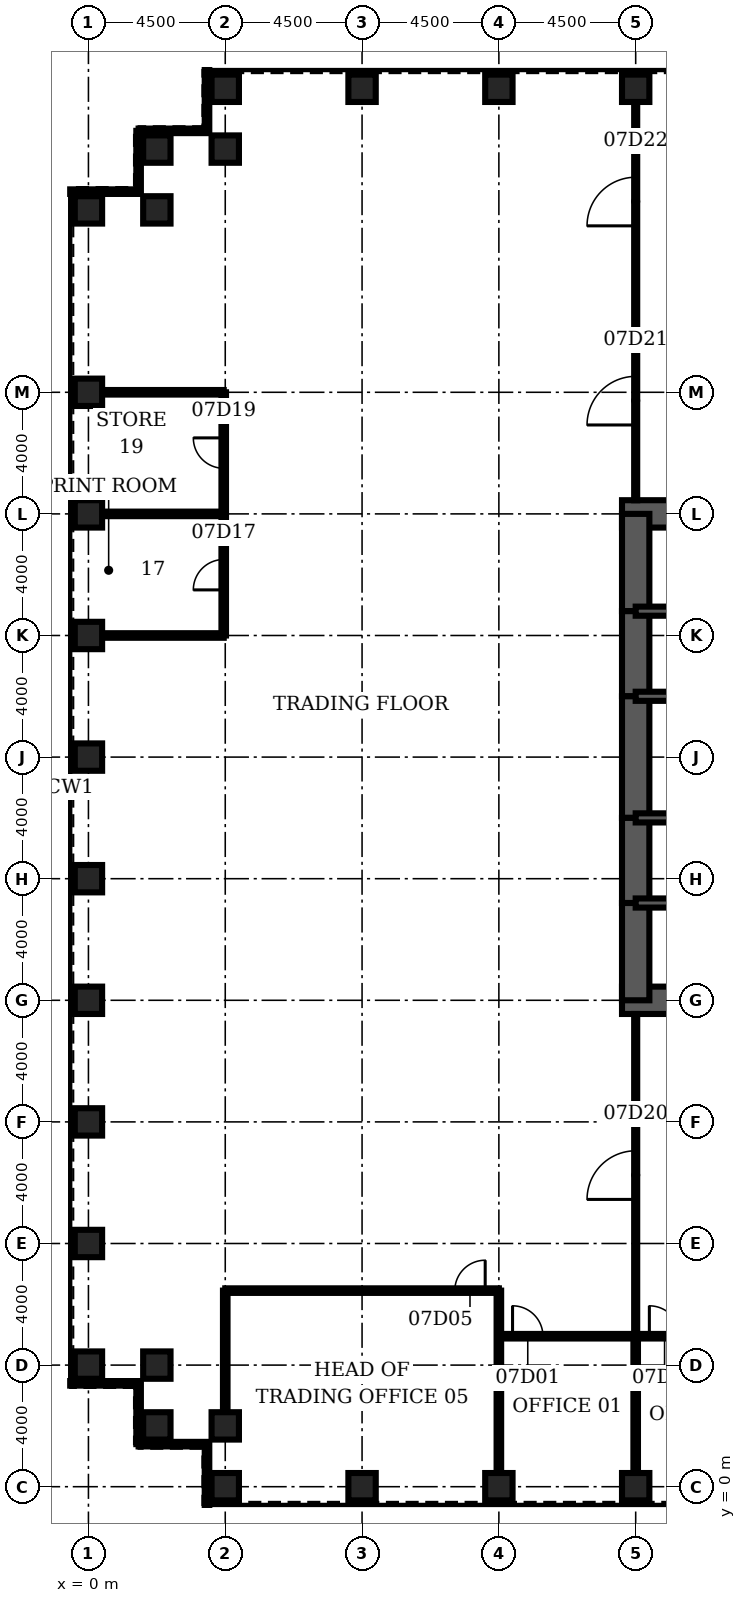
"""IFC4 building model, lengths in metres.
Left out: names, types, materials, properties, quantities, classifications, styles, units other than length and angle.
Written with IfcOpenShell. Run it as: python <this file> out.ifc"""

import sys

from ifc_helpers import new_model, si_unit, direction, frame, frame_2d, origin, origin_2d, place, context, subcontext, project, spatial, rectangle, hollow_rectangle, extrude, element, fill, save


model = new_model("IFC4")
c1 = context("Model", 3, precision=1e-05, world=origin(), true_north=direction((0.0, 1.0)))
c2 = subcontext(c1, "Body", "Model", "MODEL_VIEW")
j1 = project(units=[si_unit("LENGTHUNIT", "METRE"), si_unit("PLANEANGLEUNIT", "RADIAN")], contexts=[c1])
p1 = place(None, origin())
s1 = spatial("IfcSite", under=j1, at=p1, CompositionType="ELEMENT")
p2 = place(p1, origin())
s2 = spatial("IfcBuilding", under=s1, at=p2, CompositionType="ELEMENT")
p3 = place(p2, frame((0.0, 0.0, 36.5)))
s3 = spatial("IfcBuildingStorey", under=s2, at=p3, CompositionType="ELEMENT", Elevation=36.5)
for number, where, z_axis, x_axis in (
    (1, (4.5, 0.0, 0.0), (0.0, 0.0, 1.0), (0.0, 1.0, 0.0)),
    (2, (9.0, 0.0, 0.0), (0.0, 0.0, 1.0), (0.0, 1.0, 0.0)),
    (3, (13.5, 0.0, 0.0), (0.0, 0.0, 1.0), (0.0, 1.0, 0.0)),
    (4, (18.0, 0.0, 0.0), (0.0, 0.0, 1.0), (0.0, 1.0, 0.0)),
    (5, (18.0, 46.0, 0.0), (0.0, 0.0, 1.0), (0.0, 1.0, 0.0)),
    (6, (13.5, 46.0, 0.0), (0.0, 0.0, 1.0), (0.0, 1.0, 0.0)),
    (7, (9.0, 46.0, 0.0), (0.0, 0.0, 1.0), (0.0, 1.0, 0.0)),
    (8, (4.5, 46.0, 0.0), (0.0, 0.0, 1.0), (0.0, 1.0, 0.0)),
    (9, (4.5, 44.0, 0.0), (0.0, 0.0, 1.0), (0.0, 1.0, 0.0)),
    (10, (2.25, 44.0, 0.0), (0.0, 0.0, 1.0), (1.0, 0.0, 0.0)),
    (11, (2.25, 42.0, 0.0), (0.0, 0.0, 1.0), (1.0, 0.0, 0.0)),
    (12, (0.0, 42.0, 0.0), (0.0, 0.0, 1.0), (1.0, 0.0, 0.0)),
    (13, (0.0, 36.0, 0.0), (0.0, 0.0, 1.0), (1.0, 0.0, 0.0)),
    (14, (0.0, 32.0, 0.0), (0.0, 0.0, 1.0), (1.0, 0.0, 0.0)),
    (15, (0.0, 28.0, 0.0), (0.0, 0.0, 1.0), (1.0, 0.0, 0.0)),
    (16, (0.0, 24.0, 0.0), (0.0, 0.0, 1.0), (1.0, 0.0, 0.0)),
    (17, (0.0, 20.0, 0.0), (0.0, 0.0, 1.0), (1.0, 0.0, 0.0)),
    (18, (0.0, 16.0, 0.0), (0.0, 0.0, 1.0), (1.0, 0.0, 0.0)),
    (19, (0.0, 12.0, 0.0), (0.0, 0.0, 1.0), (1.0, 0.0, 0.0)),
    (20, (0.0, 8.0, 0.0), (0.0, 0.0, 1.0), (1.0, 0.0, 0.0)),
    (21, (0.0, 4.0, 0.0), (0.0, 0.0, 1.0), (1.0, 0.0, 0.0)),
    (22, (2.25, 4.0, 0.0), (0.0, 0.0, 1.0), (1.0, 0.0, 0.0)),
    (23, (2.25, 2.0, 0.0), (0.0, 0.0, 1.0), (1.0, 0.0, 0.0)),
    (24, (4.5, 2.0, 0.0), (0.0, 0.0, 1.0), (0.0, 1.0, 0.0)),
):
    element("IfcColumn", number, at=place(p3, frame(where, z_axis=z_axis, x_axis=x_axis)), inside=s3, PredefinedType="COLUMN", context=c2, shape_type="SweptSolid", body=[
        extrude(hollow_rectangle(XDim=0.9, YDim=0.9, WallThickness=0.12, at=origin_2d()), origin(), (0.0, 0.0, 1.0), 4.5),
    ])
for number, where, z_axis, x_axis in (
    (25, (17.55, 16.0, 0.0), (0.0, 0.0, 1.0), (1.0, 0.0, 0.0)),
    (26, (27.0, 32.0, 0.0), (0.0, 0.0, 1.0), (-1.0, 0.0, 0.0)),
):
    element("IfcWall", number, at=place(p3, frame(where, z_axis=z_axis, x_axis=x_axis)), inside=s3, PredefinedType="SHEAR", context=c2, shape_type="SweptSolid", body=[
        extrude(rectangle(XDim=9.45, YDim=0.9, at=frame_2d((4.725, 0.0))), origin(), (0.0, 0.0, 1.0), 4.5),
    ])
p4 = place(p3, frame((18.0, 32.0, 0.0), z_axis=(0.0, 0.0, 1.0), x_axis=(0.0, -1.0, 0.0)))
e27 = element("IfcWall", 27, at=p4, inside=s3, PredefinedType="SHEAR", context=c2, shape_type="SweptSolid", body=[
    extrude(rectangle(XDim=3.2, YDim=0.9, at=frame_2d((1.6, 0.0))), origin(), (0.0, 0.0, 1.0), 4.5),
])
p5 = place(p3, frame((18.0, 28.8, 0.0), z_axis=(0.0, 0.0, 1.0), x_axis=(0.0, -1.0, 0.0)))
e28 = element("IfcWall", 28, at=p5, inside=s3, PredefinedType="SHEAR", context=c2, shape_type="SweptSolid", body=[
    extrude(rectangle(XDim=2.8, YDim=0.9, at=frame_2d((1.4, 0.0))), origin(), (0.0, 0.0, 1.0), 4.5),
])
p6 = place(p5, frame((0.4, 0.0, 0.0)))
e29 = element("IfcOpeningElement", 29, at=p6, cuts=e28, PredefinedType="OPENING", context=c2, shape_type="SweptSolid", body=[
    extrude(rectangle(XDim=1.8, YDim=2.1, at=frame_2d((0.9, 1.05))), frame((0.0, 0.46, 0.0), z_axis=(0.0, -1.0, 0.0), x_axis=(1.0, 0.0, 0.0)), (0.0, 0.0, 1.0), 0.92),
])
p7 = place(p3, frame((18.0, 26.0, 0.0), z_axis=(0.0, 0.0, 1.0), x_axis=(0.0, -1.0, 0.0)))
e30 = element("IfcWall", 30, at=p7, inside=s3, PredefinedType="SHEAR", context=c2, shape_type="SweptSolid", body=[
    extrude(rectangle(XDim=4.0, YDim=0.9, at=frame_2d((2.0, 0.0))), origin(), (0.0, 0.0, 1.0), 4.5),
])
p8 = place(p3, frame((18.0, 22.0, 0.0), z_axis=(0.0, 0.0, 1.0), x_axis=(0.0, -1.0, 0.0)))
e31 = element("IfcWall", 31, at=p8, inside=s3, PredefinedType="SHEAR", context=c2, shape_type="SweptSolid", body=[
    extrude(rectangle(XDim=2.8, YDim=0.9, at=frame_2d((1.4, 0.0))), origin(), (0.0, 0.0, 1.0), 4.5),
])
p9 = place(p8, frame((0.6, 0.0, 0.0)))
e32 = element("IfcOpeningElement", 32, at=p9, cuts=e31, PredefinedType="OPENING", context=c2, shape_type="SweptSolid", body=[
    extrude(rectangle(XDim=1.8, YDim=2.1, at=frame_2d((0.9, 1.05))), frame((0.0, 0.46, 0.0), z_axis=(0.0, -1.0, 0.0), x_axis=(1.0, 0.0, 0.0)), (0.0, 0.0, 1.0), 0.92),
])
p10 = place(p3, frame((18.0, 19.2, 0.0), z_axis=(0.0, 0.0, 1.0), x_axis=(0.0, -1.0, 0.0)))
e33 = element("IfcWall", 33, at=p10, inside=s3, PredefinedType="SHEAR", context=c2, shape_type="SweptSolid", body=[
    extrude(rectangle(XDim=3.2, YDim=0.9, at=frame_2d((1.6, 0.0))), origin(), (0.0, 0.0, 1.0), 4.5),
])
p11 = place(p3, frame((18.0, 19.2, 0.0), z_axis=(0.0, 0.0, 1.0), x_axis=(1.0, 0.0, 0.0)))
e34 = element("IfcWall", 34, at=p11, inside=s3, PredefinedType="SOLIDWALL", context=c2, shape_type="SweptSolid", body=[
    extrude(rectangle(XDim=9.0, YDim=0.3, at=frame_2d((4.5, 0.0))), origin(), (0.0, 0.0, 1.0), 4.5),
])
p12 = place(p11, frame((0.65, 0.0, 0.0)))
e35 = element("IfcOpeningElement", 35, at=p12, cuts=e34, PredefinedType="OPENING", context=c2, shape_type="SweptSolid", body=[
    extrude(rectangle(XDim=1.0, YDim=2.1, at=frame_2d((0.5, 1.05))), frame((0.0, 0.16, 0.0), z_axis=(0.0, -1.0, 0.0), x_axis=(1.0, 0.0, 0.0)), (0.0, 0.0, 1.0), 0.32),
])
p13 = place(p3, frame((18.0, 28.8, 0.0), z_axis=(0.0, 0.0, 1.0), x_axis=(1.0, 0.0, 0.0)))
e36 = element("IfcWall", 36, at=p13, inside=s3, PredefinedType="SOLIDWALL", context=c2, shape_type="SweptSolid", body=[
    extrude(rectangle(XDim=9.0, YDim=0.3, at=frame_2d((4.5, 0.0))), origin(), (0.0, 0.0, 1.0), 4.5),
])
p14 = place(p13, frame((0.65, 0.0, 0.0)))
e37 = element("IfcOpeningElement", 37, at=p14, cuts=e36, PredefinedType="OPENING", context=c2, shape_type="SweptSolid", body=[
    extrude(rectangle(XDim=1.0, YDim=2.1, at=frame_2d((0.5, 1.05))), frame((0.0, 0.16, 0.0), z_axis=(0.0, -1.0, 0.0), x_axis=(1.0, 0.0, 0.0)), (0.0, 0.0, 1.0), 0.32),
])
p15 = place(p3, frame((18.0, 22.0, 0.0), z_axis=(0.0, 0.0, 1.0), x_axis=(1.0, 0.0, 0.0)))
e38 = element("IfcWall", 38, at=p15, inside=s3, PredefinedType="SOLIDWALL", context=c2, shape_type="SweptSolid", body=[
    extrude(rectangle(XDim=6.0, YDim=0.3, at=frame_2d((3.0, 0.0))), origin(), (0.0, 0.0, 1.0), 4.5),
])
p16 = place(p15, frame((2.0, 0.0, 0.0)))
e39 = element("IfcOpeningElement", 39, at=p16, cuts=e38, PredefinedType="OPENING", context=c2, shape_type="SweptSolid", body=[
    extrude(rectangle(XDim=1.0, YDim=2.1, at=frame_2d((0.5, 1.05))), frame((0.0, 0.16, 0.0), z_axis=(0.0, -1.0, 0.0), x_axis=(1.0, 0.0, 0.0)), (0.0, 0.0, 1.0), 0.32),
])
p17 = place(p3, frame((18.0, 26.0, 0.0), z_axis=(0.0, 0.0, 1.0), x_axis=(1.0, 0.0, 0.0)))
e40 = element("IfcWall", 40, at=p17, inside=s3, PredefinedType="SOLIDWALL", context=c2, shape_type="SweptSolid", body=[
    extrude(rectangle(XDim=6.0, YDim=0.3, at=frame_2d((3.0, 0.0))), origin(), (0.0, 0.0, 1.0), 4.5),
])
p18 = place(p3, frame((13.5, 4.95, 0.0), z_axis=(0.0, 0.0, 1.0), x_axis=(1.0, 0.0, 0.0)))
e41 = element("IfcWall", 41, at=p18, inside=s3, PredefinedType="PARTITIONING", context=c2, shape_type="SweptSolid", body=[
    extrude(rectangle(XDim=13.5, YDim=0.15, at=frame_2d((6.75, 0.0))), origin(), (0.0, 0.0, 1.0), 3.0),
])
p19 = place(p18, frame((0.45, 0.0, 0.0)))
e42 = element("IfcOpeningElement", 42, at=p19, cuts=e41, PredefinedType="OPENING", context=c2, shape_type="SweptSolid", body=[
    extrude(rectangle(XDim=1.0, YDim=2.1, at=frame_2d((0.5, 1.05))), frame((0.0, 0.085, 0.0), z_axis=(0.0, -1.0, 0.0), x_axis=(1.0, 0.0, 0.0)), (0.0, 0.0, 1.0), 0.17),
])
p20 = place(p18, frame((4.95, 0.0, 0.0)))
e43 = element("IfcOpeningElement", 43, at=p20, cuts=e41, PredefinedType="OPENING", context=c2, shape_type="SweptSolid", body=[
    extrude(rectangle(XDim=1.0, YDim=2.1, at=frame_2d((0.5, 1.05))), frame((0.0, 0.085, 0.0), z_axis=(0.0, -1.0, 0.0), x_axis=(1.0, 0.0, 0.0)), (0.0, 0.0, 1.0), 0.17),
])
p21 = place(p18, frame((9.45, 0.0, 0.0)))
e44 = element("IfcOpeningElement", 44, at=p21, cuts=e41, PredefinedType="OPENING", context=c2, shape_type="SweptSolid", body=[
    extrude(rectangle(XDim=1.0, YDim=2.1, at=frame_2d((0.5, 1.05))), frame((0.0, 0.085, 0.0), z_axis=(0.0, -1.0, 0.0), x_axis=(1.0, 0.0, 0.0)), (0.0, 0.0, 1.0), 0.17),
])
p22 = place(p3, frame((4.5, 6.45, 0.0), z_axis=(0.0, 0.0, 1.0), x_axis=(1.0, 0.0, 0.0)))
e45 = element("IfcWall", 45, at=p22, inside=s3, PredefinedType="PARTITIONING", context=c2, shape_type="SweptSolid", body=[
    extrude(rectangle(XDim=9.0, YDim=0.15, at=frame_2d((4.5, 0.0))), origin(), (0.0, 0.0, 1.0), 3.0),
])
p23 = place(p22, frame((7.55, 0.0, 0.0)))
e46 = element("IfcOpeningElement", 46, at=p23, cuts=e45, PredefinedType="OPENING", context=c2, shape_type="SweptSolid", body=[
    extrude(rectangle(XDim=1.0, YDim=2.1, at=frame_2d((0.5, 1.05))), frame((0.0, 0.085, 0.0), z_axis=(0.0, -1.0, 0.0), x_axis=(1.0, 0.0, 0.0)), (0.0, 0.0, 1.0), 0.17),
])
for number, where, z_axis, x_axis in (
    (47, (0.45, 28.0, 0.0), (0.0, 0.0, 1.0), (1.0, 0.0, 0.0)),
    (48, (0.45, 32.0, 0.0), (0.0, 0.0, 1.0), (1.0, 0.0, 0.0)),
    (49, (0.45, 36.0, 0.0), (0.0, 0.0, 1.0), (1.0, 0.0, 0.0)),
):
    element("IfcWall", number, at=place(p3, frame(where, z_axis=z_axis, x_axis=x_axis)), inside=s3, PredefinedType="PARTITIONING", context=c2, shape_type="SweptSolid", body=[
        extrude(rectangle(XDim=4.0, YDim=0.15, at=frame_2d((2.0, 0.0))), origin(), (0.0, 0.0, 1.0), 3.0),
    ])
p24 = place(p3, frame((4.45, 28.0, 0.0), z_axis=(0.0, 0.0, 1.0), x_axis=(0.0, 1.0, 0.0)))
e50 = element("IfcWall", 50, at=p24, inside=s3, PredefinedType="PARTITIONING", context=c2, shape_type="SweptSolid", body=[
    extrude(rectangle(XDim=8.0, YDim=0.15, at=frame_2d((4.0, 0.0))), origin(), (0.0, 0.0, 1.0), 3.0),
])
p25 = place(p24, frame((1.5, 0.0, 0.0)))
e51 = element("IfcOpeningElement", 51, at=p25, cuts=e50, PredefinedType="OPENING", context=c2, shape_type="SweptSolid", body=[
    extrude(rectangle(XDim=1.0, YDim=2.1, at=frame_2d((0.5, 1.05))), frame((0.0, 0.085, 0.0), z_axis=(0.0, -1.0, 0.0), x_axis=(1.0, 0.0, 0.0)), (0.0, 0.0, 1.0), 0.17),
])
p26 = place(p24, frame((5.5, 0.0, 0.0)))
e52 = element("IfcOpeningElement", 52, at=p26, cuts=e50, PredefinedType="OPENING", context=c2, shape_type="SweptSolid", body=[
    extrude(rectangle(XDim=1.0, YDim=2.1, at=frame_2d((0.5, 1.05))), frame((0.0, 0.085, 0.0), z_axis=(0.0, -1.0, 0.0), x_axis=(1.0, 0.0, 0.0)), (0.0, 0.0, 1.0), 0.17),
])
p27 = place(p3, frame((4.5, 2.45, 0.0), z_axis=(0.0, 0.0, 1.0), x_axis=(0.0, 1.0, 0.0)))
e53 = element("IfcWall", 53, at=p27, inside=s3, PredefinedType="PARTITIONING", context=c2, shape_type="SweptSolid", body=[
    extrude(rectangle(XDim=4.0, YDim=0.15, at=frame_2d((2.0, 0.0))), origin(), (0.0, 0.0, 1.0), 3.0),
])
p28 = place(p3, frame((13.5, 0.45, 0.0), z_axis=(0.0, 0.0, 1.0), x_axis=(0.0, 1.0, 0.0)))
e54 = element("IfcWall", 54, at=p28, inside=s3, PredefinedType="PARTITIONING", context=c2, shape_type="SweptSolid", body=[
    extrude(rectangle(XDim=6.0, YDim=0.15, at=frame_2d((3.0, 0.0))), origin(), (0.0, 0.0, 1.0), 3.0),
])
p29 = place(p3, frame((18.0, 0.45, 0.0), z_axis=(0.0, 0.0, 1.0), x_axis=(0.0, 1.0, 0.0)))
e55 = element("IfcWall", 55, at=p29, inside=s3, PredefinedType="PARTITIONING", context=c2, shape_type="SweptSolid", body=[
    extrude(rectangle(XDim=4.5, YDim=0.15, at=frame_2d((2.25, 0.0))), origin(), (0.0, 0.0, 1.0), 3.0),
])
p30 = place(p3, frame((18.0, 4.95, 0.0), z_axis=(0.0, 0.0, 1.0), x_axis=(0.0, 1.0, 0.0)))
e56 = element("IfcWall", 56, at=p30, inside=s3, PredefinedType="PARTITIONING", context=c2, shape_type="SweptSolid", body=[
    extrude(rectangle(XDim=10.6, YDim=0.1, at=frame_2d((5.3, 0.0))), origin(), (0.0, 0.0, 1.0), 3.0),
])
p31 = place(p30, frame((4.5, 0.0, 0.0)))
e57 = element("IfcOpeningElement", 57, at=p31, cuts=e56, PredefinedType="OPENING", context=c2, shape_type="SweptSolid", body=[
    extrude(rectangle(XDim=1.6, YDim=2.1, at=frame_2d((0.8, 1.05))), frame((0.0, 0.06, 0.0), z_axis=(0.0, -1.0, 0.0), x_axis=(1.0, 0.0, 0.0)), (0.0, 0.0, 1.0), 0.12),
])
p32 = place(p3, frame((18.0, 32.45, 0.0), z_axis=(0.0, 0.0, 1.0), x_axis=(0.0, 1.0, 0.0)))
e58 = element("IfcWall", 58, at=p32, inside=s3, PredefinedType="PARTITIONING", context=c2, shape_type="SweptSolid", body=[
    extrude(rectangle(XDim=13.1, YDim=0.1, at=frame_2d((6.55, 0.0))), origin(), (0.0, 0.0, 1.0), 3.0),
])
p33 = place(p32, frame((2.475, 0.0, 0.0)))
e59 = element("IfcOpeningElement", 59, at=p33, cuts=e58, PredefinedType="OPENING", context=c2, shape_type="SweptSolid", body=[
    extrude(rectangle(XDim=1.6, YDim=2.1, at=frame_2d((0.8, 1.05))), frame((0.0, 0.06, 0.0), z_axis=(0.0, -1.0, 0.0), x_axis=(1.0, 0.0, 0.0)), (0.0, 0.0, 1.0), 0.12),
])
p34 = place(p32, frame((9.025, 0.0, 0.0)))
e60 = element("IfcOpeningElement", 60, at=p34, cuts=e58, PredefinedType="OPENING", context=c2, shape_type="SweptSolid", body=[
    extrude(rectangle(XDim=1.6, YDim=2.1, at=frame_2d((0.8, 1.05))), frame((0.0, 0.06, 0.0), z_axis=(0.0, -1.0, 0.0), x_axis=(1.0, 0.0, 0.0)), (0.0, 0.0, 1.0), 0.12),
])
p35 = place(p3, frame((3.9, 46.6, 0.0), z_axis=(0.0, 0.0, 1.0), x_axis=(0.0, -1.0, 0.0)))
e61 = element("IfcWall", 61, at=p35, inside=s3, PredefinedType="ELEMENTEDWALL", context=c2, shape_type="SweptSolid", body=[
    extrude(rectangle(XDim=2.0, YDim=0.15, at=frame_2d((1.0, 0.0))), origin(), (0.0, 0.0, 1.0), 4.32),
])
p36 = place(p3, frame((3.9, 44.6, 0.0), z_axis=(0.0, 0.0, 1.0), x_axis=(-1.0, 0.0, 0.0)))
e62 = element("IfcWall", 62, at=p36, inside=s3, PredefinedType="ELEMENTEDWALL", context=c2, shape_type="SweptSolid", body=[
    extrude(rectangle(XDim=2.25, YDim=0.15, at=frame_2d((1.125, 0.0))), origin(), (0.0, 0.0, 1.0), 4.32),
])
p37 = place(p3, frame((1.65, 44.6, 0.0), z_axis=(0.0, 0.0, 1.0), x_axis=(0.0, -1.0, 0.0)))
e63 = element("IfcWall", 63, at=p37, inside=s3, PredefinedType="ELEMENTEDWALL", context=c2, shape_type="SweptSolid", body=[
    extrude(rectangle(XDim=2.0, YDim=0.15, at=frame_2d((1.0, 0.0))), origin(), (0.0, 0.0, 1.0), 4.32),
])
for number, where, z_axis, x_axis in (
    (64, (1.65, 42.6, 0.0), (0.0, 0.0, 1.0), (-1.0, 0.0, 0.0)),
    (65, (-0.6, 3.4, 0.0), (0.0, 0.0, 1.0), (1.0, 0.0, 0.0)),
):
    element("IfcWall", number, at=place(p3, frame(where, z_axis=z_axis, x_axis=x_axis)), inside=s3, PredefinedType="ELEMENTEDWALL", context=c2, shape_type="SweptSolid", body=[
        extrude(rectangle(XDim=2.25, YDim=0.15, at=frame_2d((1.125, 0.0))), origin(), (0.0, 0.0, 1.0), 4.32),
    ])
p38 = place(p3, frame((1.65, 3.4, 0.0), z_axis=(0.0, 0.0, 1.0), x_axis=(0.0, -1.0, 0.0)))
e66 = element("IfcWall", 66, at=p38, inside=s3, PredefinedType="ELEMENTEDWALL", context=c2, shape_type="SweptSolid", body=[
    extrude(rectangle(XDim=2.0, YDim=0.15, at=frame_2d((1.0, 0.0))), origin(), (0.0, 0.0, 1.0), 4.32),
])
p39 = place(p3, frame((1.65, 1.4, 0.0), z_axis=(0.0, 0.0, 1.0), x_axis=(1.0, 0.0, 0.0)))
e67 = element("IfcWall", 67, at=p39, inside=s3, PredefinedType="ELEMENTEDWALL", context=c2, shape_type="SweptSolid", body=[
    extrude(rectangle(XDim=2.25, YDim=0.15, at=frame_2d((1.125, 0.0))), origin(), (0.0, 0.0, 1.0), 4.32),
])
p40 = place(p3, frame((3.9, 1.4, 0.0), z_axis=(0.0, 0.0, 1.0), x_axis=(0.0, -1.0, 0.0)))
e68 = element("IfcWall", 68, at=p40, inside=s3, PredefinedType="ELEMENTEDWALL", context=c2, shape_type="SweptSolid", body=[
    extrude(rectangle(XDim=2.0, YDim=0.15, at=frame_2d((1.0, 0.0))), origin(), (0.0, 0.0, 1.0), 4.32),
])
p41 = place(p19, origin())
e69 = element("IfcDoor", 69, at=p41, inside=s3, OperationType="SINGLE_SWING_LEFT", PredefinedType="DOOR", context=c2, shape_type="SweptSolid", body=[
    extrude(rectangle(XDim=1.0, YDim=2.1, at=frame_2d((0.5, 1.05))), frame((0.0, 0.025, 0.0), z_axis=(0.0, -1.0, 0.0), x_axis=(1.0, 0.0, 0.0)), (0.0, 0.0, 1.0), 0.05),
])
fill(e42, e69)
p42 = place(p20, origin())
e70 = element("IfcDoor", 70, at=p42, inside=s3, OperationType="SINGLE_SWING_LEFT", PredefinedType="DOOR", context=c2, shape_type="SweptSolid", body=[
    extrude(rectangle(XDim=1.0, YDim=2.1, at=frame_2d((0.5, 1.05))), frame((0.0, 0.025, 0.0), z_axis=(0.0, -1.0, 0.0), x_axis=(1.0, 0.0, 0.0)), (0.0, 0.0, 1.0), 0.05),
])
fill(e43, e70)
p43 = place(p23, origin())
e71 = element("IfcDoor", 71, at=p43, inside=s3, OperationType="SINGLE_SWING_RIGHT", PredefinedType="DOOR", context=c2, shape_type="SweptSolid", body=[
    extrude(rectangle(XDim=1.0, YDim=2.1, at=frame_2d((0.5, 1.05))), frame((0.0, 0.025, 0.0), z_axis=(0.0, -1.0, 0.0), x_axis=(1.0, 0.0, 0.0)), (0.0, 0.0, 1.0), 0.05),
])
fill(e46, e71)
p44 = place(p25, origin())
e72 = element("IfcDoor", 72, at=p44, inside=s3, OperationType="SINGLE_SWING_LEFT", PredefinedType="DOOR", context=c2, shape_type="SweptSolid", body=[
    extrude(rectangle(XDim=1.0, YDim=2.1, at=frame_2d((0.5, 1.05))), frame((0.0, 0.025, 0.0), z_axis=(0.0, -1.0, 0.0), x_axis=(1.0, 0.0, 0.0)), (0.0, 0.0, 1.0), 0.05),
])
fill(e51, e72)
p45 = place(p26, origin())
e73 = element("IfcDoor", 73, at=p45, inside=s3, OperationType="SINGLE_SWING_RIGHT", PredefinedType="DOOR", context=c2, shape_type="SweptSolid", body=[
    extrude(rectangle(XDim=1.0, YDim=2.1, at=frame_2d((0.5, 1.05))), frame((0.0, 0.025, 0.0), z_axis=(0.0, -1.0, 0.0), x_axis=(1.0, 0.0, 0.0)), (0.0, 0.0, 1.0), 0.05),
])
fill(e52, e73)
p46 = place(p31, origin())
e74 = element("IfcDoor", 74, at=p46, inside=s3, OperationType="SINGLE_SWING_LEFT", PredefinedType="DOOR", context=c2, shape_type="SweptSolid", body=[
    extrude(rectangle(XDim=1.6, YDim=2.1, at=frame_2d((0.8, 1.05))), frame((0.0, 0.025, 0.0), z_axis=(0.0, -1.0, 0.0), x_axis=(1.0, 0.0, 0.0)), (0.0, 0.0, 1.0), 0.05),
])
fill(e57, e74)
p47 = place(p33, origin())
e75 = element("IfcDoor", 75, at=p47, inside=s3, OperationType="SINGLE_SWING_LEFT", PredefinedType="DOOR", context=c2, shape_type="SweptSolid", body=[
    extrude(rectangle(XDim=1.6, YDim=2.1, at=frame_2d((0.8, 1.05))), frame((0.0, 0.025, 0.0), z_axis=(0.0, -1.0, 0.0), x_axis=(1.0, 0.0, 0.0)), (0.0, 0.0, 1.0), 0.05),
])
fill(e59, e75)
p48 = place(p34, origin())
e76 = element("IfcDoor", 76, at=p48, inside=s3, OperationType="SINGLE_SWING_LEFT", PredefinedType="DOOR", context=c2, shape_type="SweptSolid", body=[
    extrude(rectangle(XDim=1.6, YDim=2.1, at=frame_2d((0.8, 1.05))), frame((0.0, 0.025, 0.0), z_axis=(0.0, -1.0, 0.0), x_axis=(1.0, 0.0, 0.0)), (0.0, 0.0, 1.0), 0.05),
])
fill(e60, e76)
p49 = place(p12, origin())
e77 = element("IfcDoor", 77, at=p49, inside=s3, OperationType="SINGLE_SWING_LEFT", PredefinedType="DOOR", context=c2, shape_type="SweptSolid", body=[
    extrude(rectangle(XDim=1.0, YDim=2.1, at=frame_2d((0.5, 1.05))), frame((0.0, 0.025, 0.0), z_axis=(0.0, -1.0, 0.0), x_axis=(1.0, 0.0, 0.0)), (0.0, 0.0, 1.0), 0.05),
])
fill(e35, e77)
p50 = place(p14, origin())
e78 = element("IfcDoor", 78, at=p50, inside=s3, OperationType="SINGLE_SWING_LEFT", PredefinedType="DOOR", context=c2, shape_type="SweptSolid", body=[
    extrude(rectangle(XDim=1.0, YDim=2.1, at=frame_2d((0.5, 1.05))), frame((0.0, 0.025, 0.0), z_axis=(0.0, -1.0, 0.0), x_axis=(1.0, 0.0, 0.0)), (0.0, 0.0, 1.0), 0.05),
])
fill(e37, e78)
p51 = place(p9, origin())
e79 = element("IfcDoor", 79, at=p51, inside=s3, OperationType="SINGLE_SWING_LEFT", PredefinedType="DOOR", context=c2, shape_type="SweptSolid", body=[
    extrude(rectangle(XDim=1.8, YDim=2.1, at=frame_2d((0.9, 1.05))), frame((0.0, 0.45, 0.0), z_axis=(0.0, -1.0, 0.0), x_axis=(1.0, 0.0, 0.0)), (0.0, 0.0, 1.0), 0.899),
])
fill(e32, e79)
p52 = place(p6, origin())
e80 = element("IfcDoor", 80, at=p52, inside=s3, OperationType="SINGLE_SWING_LEFT", PredefinedType="DOOR", context=c2, shape_type="SweptSolid", body=[
    extrude(rectangle(XDim=1.8, YDim=2.1, at=frame_2d((0.9, 1.05))), frame((0.0, 0.45, 0.0), z_axis=(0.0, -1.0, 0.0), x_axis=(1.0, 0.0, 0.0)), (0.0, 0.0, 1.0), 0.899),
])
fill(e29, e80)
save(model, sys.argv[1])
